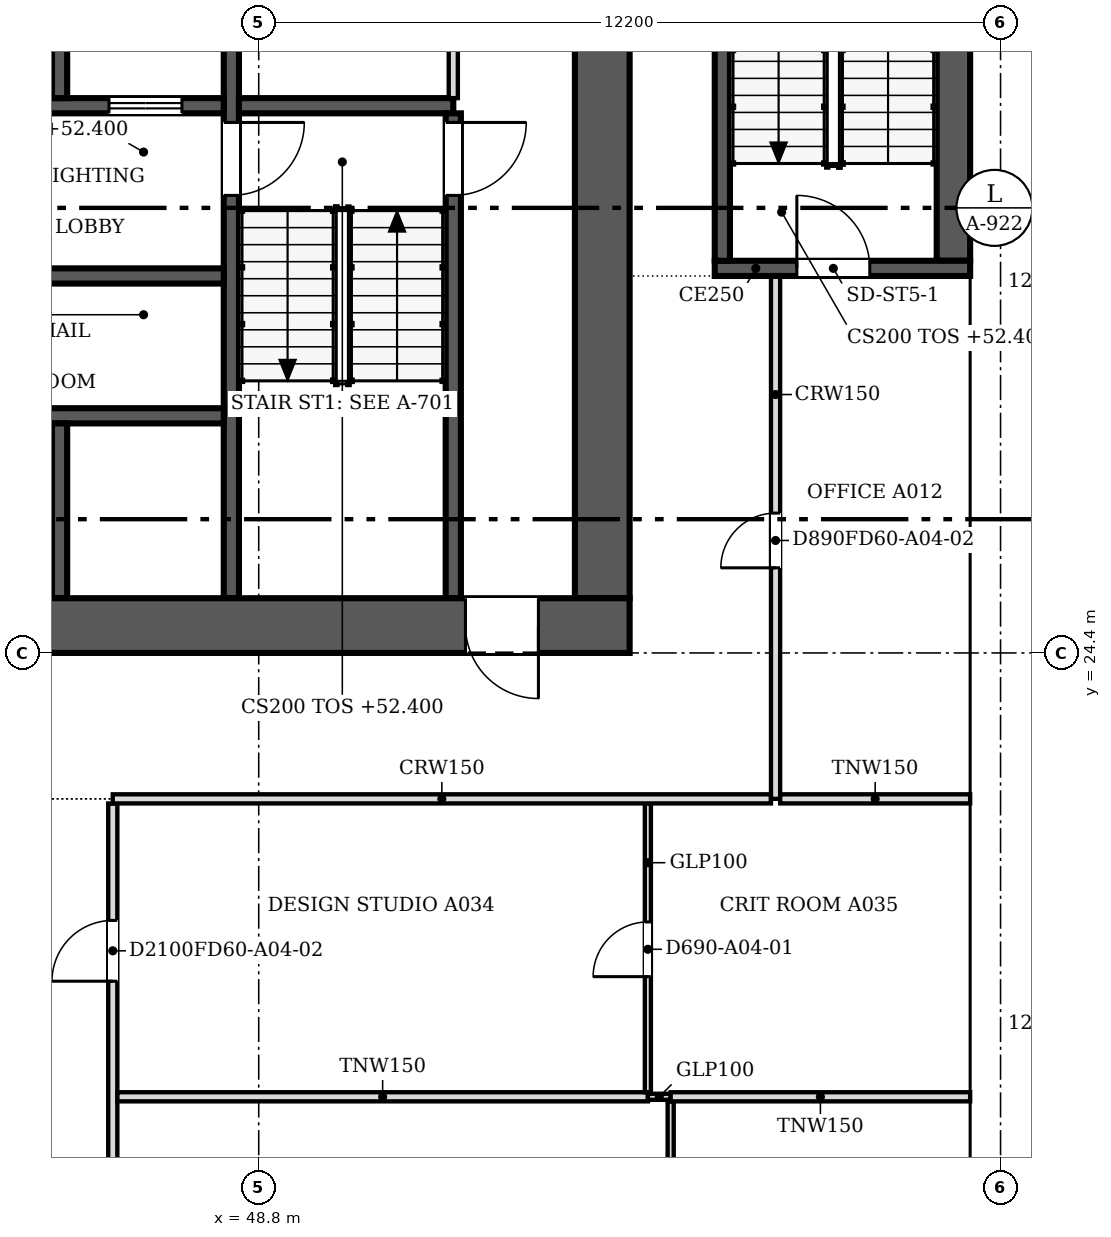
"""IFC4 building model, lengths in metres.
Left out: names, types, materials, properties, quantities, classifications, styles, units other than length and angle.
Written with IfcOpenShell. Run it as: python <this file> out.ifc"""

import sys

from ifc_helpers import new_model, si_unit, direction, frame, frame_2d, origin, place, context, subcontext, project, spatial, polyline, rectangle, outline, extrude, faceted_brep, source, transform, mapped, element, fill, save


model = new_model("IFC4")
c1 = context("Model", 3, precision=1e-05, world=origin(), true_north=direction((0.0, 1.0)))
c2 = subcontext(c1, "Body", "Model", "MODEL_VIEW")
j1 = project(units=[si_unit("LENGTHUNIT", "METRE"), si_unit("PLANEANGLEUNIT", "RADIAN")], contexts=[c1])
p1 = place(None, origin())
s1 = spatial("IfcSite", under=j1, at=p1, CompositionType="ELEMENT")
p2 = place(p1, origin())
s2 = spatial("IfcBuilding", under=s1, at=p2, CompositionType="ELEMENT")
p3 = place(p2, frame((0.0, 0.0, 52.4)))
s3 = spatial("IfcBuildingStorey", under=s2, at=p3, CompositionType="ELEMENT", Elevation=52.4)
m1 = source(origin(), c2, "Body", "SweptSolid", [
    extrude(outline(polyline([(3.05, 0.0), (6.1, 3.8), (3.05, 7.6), (0.0, 3.8), (3.05, 0.0)])), frame((0.0, 0.25, 0.0), z_axis=(0.0, -1.0, 0.0), x_axis=(1.0, 0.0, 0.0)), (0.0, 0.0, 1.0), 0.5),
])
p4 = place(p3, frame((60.75, 15.25, -3.8), z_axis=(0.0, 0.0, 1.0), x_axis=(0.0, 1.0, 0.0)))
e1 = element("IfcWall", 1, at=p4, inside=s3, PredefinedType="SOLIDWALL", context=c2, shape_type="MappedRepresentation", body=[
    mapped(m1, transform((0.0, 0.0, 0.0), scale=1.0)),
])
m2 = source(origin(), c2, "Body", "SweptSolid", [
    extrude(outline(polyline([(3.05, 0.399), (5.78, 3.8), (3.05, 7.2), (0.321, 3.8), (3.05, 0.399)])), frame((0.0, 0.26, 0.0), z_axis=(0.0, -1.0, 0.0), x_axis=(1.0, 0.0, 0.0)), (0.0, 0.0, 1.0), 0.52),
])
p5 = place(p4, origin())
e2 = element("IfcOpeningElement", 2, at=p5, cuts=e1, PredefinedType="OPENING", context=c2, shape_type="MappedRepresentation", body=[
    mapped(m2, transform((0.0, 0.0, 0.0), scale=1.0)),
])
m3 = source(origin(), c2, "Body", "Brep", [
    faceted_brep([(3.05, -0.25, 0.0), (6.1, -0.25, 3.8), (6.1, -0.25, 3.8), (3.05, -0.25, 7.6), (0.0, -0.25, 3.8), (0.0, 0.25, 3.8), (3.05, 0.25, 7.6), (6.1, 0.25, 3.8), (6.1, 0.25, 3.8), (3.05, 0.25, 0.0)], [[[0, 1, 2, 3, 4]], [[5, 6, 7, 8, 9]], [[9, 8, 1, 0]], [[7, 6, 3, 2]], [[6, 5, 4, 3]], [[5, 9, 0, 4]], [[1, 8, 7, 2]]]),
])
p6 = place(p3, frame((60.75, 21.35, -3.8), z_axis=(0.0, 0.0, 1.0), x_axis=(0.0, 1.0, 0.0)))
e3 = element("IfcWall", 3, at=p6, inside=s3, PredefinedType="SOLIDWALL", context=c2, shape_type="MappedRepresentation", body=[
    mapped(m3, transform((0.0, 0.0, 0.0), scale=1.0)),
])
p7 = place(p6, origin())
e4 = element("IfcOpeningElement", 4, at=p7, cuts=e3, PredefinedType="OPENING", context=c2, shape_type="MappedRepresentation", body=[
    mapped(m2, transform((0.0, 0.0, 0.0), scale=1.0)),
])
p8 = place(p3, frame((60.75, 27.45, -3.8), z_axis=(0.0, 0.0, 1.0), x_axis=(0.0, 1.0, 0.0)))
e5 = element("IfcWall", 5, at=p8, inside=s3, PredefinedType="SOLIDWALL", context=c2, shape_type="MappedRepresentation", body=[
    mapped(m1, transform((0.0, 0.0, 0.0), scale=1.0)),
])
p9 = place(p8, origin())
e6 = element("IfcOpeningElement", 6, at=p9, cuts=e5, PredefinedType="OPENING", context=c2, shape_type="MappedRepresentation", body=[
    mapped(m2, transform((0.0, 0.0, 0.0), scale=1.0)),
])
p10 = place(p3, frame((60.75, 33.55, -3.8), z_axis=(0.0, 0.0, 1.0), x_axis=(0.0, 1.0, 0.0)))
e7 = element("IfcWall", 7, at=p10, inside=s3, PredefinedType="SOLIDWALL", context=c2, shape_type="MappedRepresentation", body=[
    mapped(m3, transform((0.0, 0.0, 0.0), scale=1.0)),
])
p11 = place(p10, origin())
e8 = element("IfcOpeningElement", 8, at=p11, cuts=e7, PredefinedType="OPENING", context=c2, shape_type="MappedRepresentation", body=[
    mapped(m2, transform((0.0, 0.0, 0.0), scale=1.0)),
])
p12 = place(p2, frame((0.0, 0.0, 56.2)))
s4 = spatial("IfcBuildingStorey", under=s2, at=p12, CompositionType="ELEMENT", Elevation=56.2)
m4 = source(origin(), c2, "Body", "SweptSolid", [
    extrude(outline(polyline([(3.05, 0.0), (6.1, 3.8), (3.05, 7.6), (0.0, 3.8), (3.05, 0.0)])), frame((0.0, 0.25, 0.0), z_axis=(0.0, -1.0, 0.0), x_axis=(1.0, 0.0, 0.0)), (0.0, 0.0, 1.0), 0.5),
])
p13 = place(p12, frame((60.75, 12.2, -3.8), z_axis=(0.0, 0.0, 1.0), x_axis=(0.0, 1.0, 0.0)))
e9 = element("IfcWall", 9, at=p13, inside=s4, PredefinedType="SOLIDWALL", context=c2, shape_type="MappedRepresentation", body=[
    mapped(m4, transform((0.0, 0.0, 0.0), scale=1.0)),
])
m5 = source(origin(), c2, "Body", "SweptSolid", [
    extrude(outline(polyline([(3.05, 0.399), (5.78, 3.8), (3.05, 7.201), (0.321, 3.8), (3.05, 0.399)])), frame((0.0, 0.26, 0.0), z_axis=(0.0, -1.0, 0.0), x_axis=(1.0, 0.0, 0.0)), (0.0, 0.0, 1.0), 0.52),
])
p14 = place(p13, origin())
e10 = element("IfcOpeningElement", 10, at=p14, cuts=e9, PredefinedType="OPENING", context=c2, shape_type="MappedRepresentation", body=[
    mapped(m5, transform((0.0, 0.0, 0.0), scale=1.0)),
])
m6 = source(origin(), c2, "Body", "Brep", [
    faceted_brep([(3.05, -0.25, 0.0), (6.1, -0.25, 3.8), (6.1, -0.25, 3.8), (3.05, -0.25, 7.6), (0.0, -0.25, 3.8), (0.0, 0.25, 3.8), (3.05, 0.25, 7.6), (6.1, 0.25, 3.8), (6.1, 0.25, 3.8), (3.05, 0.25, 0.0)], [[[0, 1, 2, 3, 4]], [[5, 6, 7, 8, 9]], [[9, 8, 1, 0]], [[7, 6, 3, 2]], [[6, 5, 4, 3]], [[5, 9, 0, 4]], [[1, 8, 7, 2]]]),
])
p15 = place(p12, frame((60.75, 18.3, -3.8), z_axis=(0.0, 0.0, 1.0), x_axis=(0.0, 1.0, 0.0)))
e11 = element("IfcWall", 11, at=p15, inside=s4, PredefinedType="SOLIDWALL", context=c2, shape_type="MappedRepresentation", body=[
    mapped(m6, transform((0.0, 0.0, 0.0), scale=1.0)),
])
p16 = place(p15, origin())
e12 = element("IfcOpeningElement", 12, at=p16, cuts=e11, PredefinedType="OPENING", context=c2, shape_type="MappedRepresentation", body=[
    mapped(m5, transform((0.0, 0.0, 0.0), scale=1.0)),
])
p17 = place(p12, frame((60.75, 24.4, -3.8), z_axis=(0.0, 0.0, 1.0), x_axis=(0.0, 1.0, 0.0)))
e13 = element("IfcWall", 13, at=p17, inside=s4, PredefinedType="SOLIDWALL", context=c2, shape_type="MappedRepresentation", body=[
    mapped(m4, transform((0.0, 0.0, 0.0), scale=1.0)),
])
p18 = place(p17, origin())
e14 = element("IfcOpeningElement", 14, at=p18, cuts=e13, PredefinedType="OPENING", context=c2, shape_type="MappedRepresentation", body=[
    mapped(m5, transform((0.0, 0.0, 0.0), scale=1.0)),
])
p19 = place(p12, frame((60.75, 30.5, -3.8), z_axis=(0.0, 0.0, 1.0), x_axis=(0.0, 1.0, 0.0)))
e15 = element("IfcWall", 15, at=p19, inside=s4, PredefinedType="SOLIDWALL", context=c2, shape_type="MappedRepresentation", body=[
    mapped(m4, transform((0.0, 0.0, 0.0), scale=1.0)),
])
p20 = place(p19, origin())
e16 = element("IfcOpeningElement", 16, at=p20, cuts=e15, PredefinedType="OPENING", context=c2, shape_type="MappedRepresentation", body=[
    mapped(m5, transform((0.0, 0.0, 0.0), scale=1.0)),
])
p21 = place(p3, frame((54.9, 24.85, 0.0), z_axis=(0.0, 0.0, 1.0), x_axis=(-1.0, 0.0, 0.0)))
e17 = element("IfcWall", 17, at=p21, inside=s3, PredefinedType="SHEAR", context=c2, shape_type="SweptSolid", body=[
    extrude(rectangle(XDim=24.4, YDim=0.9, at=frame_2d((12.2, 0.0))), origin(), (0.0, 0.0, 1.0), 3.8),
])
m7 = source(origin(), c2, "Body", "SweptSolid", [
    extrude(rectangle(XDim=1.2, YDim=2.1, at=frame_2d((0.6, 1.05))), frame((0.0, 0.46, 0.0), z_axis=(0.0, -1.0, 0.0), x_axis=(1.0, 0.0, 0.0)), (0.0, 0.0, 1.0), 0.92),
])
p22 = place(p21, frame((1.5, 0.0, 0.0)))
e18 = element("IfcOpeningElement", 18, at=p22, cuts=e17, PredefinedType="OPENING", context=c2, shape_type="MappedRepresentation", body=[
    mapped(m7, transform((0.0, 0.0, 0.0), scale=1.0)),
])
p23 = place(p3, frame((54.45, 47.9, 0.0), z_axis=(0.0, 0.0, 1.0), x_axis=(0.0, -1.0, 0.0)))
e19 = element("IfcWall", 19, at=p23, inside=s3, PredefinedType="SHEAR", context=c2, shape_type="SweptSolid", body=[
    extrude(rectangle(XDim=22.6, YDim=0.9, at=frame_2d((11.3, 0.0))), origin(), (0.0, 0.0, 1.0), 3.8),
])
p24 = place(p23, frame((4.6, 0.0, 0.0)))
e20 = element("IfcOpeningElement", 20, at=p24, cuts=e19, PredefinedType="OPENING", context=c2, shape_type="MappedRepresentation", body=[
    mapped(m7, transform((0.0, 0.0, 0.0), scale=1.0)),
])
p25 = place(p3, frame((48.35, 36.35, 0.0), z_axis=(0.0, 0.0, 1.0), x_axis=(0.0, -1.0, 0.0)))
e21 = element("IfcWall", 21, at=p25, inside=s3, PredefinedType="SOLIDWALL", context=c2, shape_type="SweptSolid", body=[
    extrude(rectangle(XDim=11.05, YDim=0.25, at=frame_2d((5.525, 0.0))), origin(), (0.0, 0.0, 1.0), 3.8),
])
m8 = source(origin(), c2, "Body", "SweptSolid", [
    extrude(rectangle(XDim=1.2, YDim=2.1, at=frame_2d((0.6, 1.05))), frame((0.0, 0.135, 0.0), z_axis=(0.0, -1.0, 0.0), x_axis=(1.0, 0.0, 0.0)), (0.0, 0.0, 1.0), 0.27),
])
p26 = place(p25, frame((3.225, 0.0, 0.0)))
e22 = element("IfcOpeningElement", 22, at=p26, cuts=e21, PredefinedType="OPENING", context=c2, shape_type="MappedRepresentation", body=[
    mapped(m8, transform((0.0, 0.0, 0.0), scale=1.0)),
])
p27 = place(p3, frame((48.225, 33.4, 0.0), z_axis=(0.0, 0.0, 1.0), x_axis=(-1.0, 0.0, 0.0)))
e23 = element("IfcWall", 23, at=p27, inside=s3, PredefinedType="SOLIDWALL", context=c2, shape_type="SweptSolid", body=[
    extrude(rectangle(XDim=5.275, YDim=0.25, at=frame_2d((2.638, 0.0))), origin(), (0.0, 0.0, 1.0), 3.8),
])
p28 = place(p27, frame((3.512, 0.0, 0.0)))
e24 = element("IfcOpeningElement", 24, at=p28, cuts=e23, PredefinedType="OPENING", context=c2, shape_type="MappedRepresentation", body=[
    mapped(m8, transform((0.0, 0.0, 0.0), scale=1.0)),
])
p29 = place(p27, frame((0.688, 0.0, 0.0)))
e25 = element("IfcOpeningElement", 25, at=p29, cuts=e23, PredefinedType="OPENING", context=c2, shape_type="MappedRepresentation", body=[
    mapped(m8, transform((0.0, 0.0, 0.0), scale=1.0)),
])
p30 = place(p3, frame((48.475, 33.4, 0.0), z_axis=(0.0, 0.0, 1.0), x_axis=(1.0, 0.0, 0.0)))
e26 = element("IfcWall", 26, at=p30, inside=s3, PredefinedType="SOLIDWALL", context=c2, shape_type="SweptSolid", body=[
    extrude(rectangle(XDim=3.525, YDim=0.25, at=frame_2d((1.762, 0.0))), origin(), (0.0, 0.0, 1.0), 3.8),
])
p31 = place(p3, frame((42.95, 28.3, 0.0), z_axis=(0.0, 0.0, 1.0), x_axis=(1.0, 0.0, 0.0)))
e27 = element("IfcWall", 27, at=p31, inside=s3, PredefinedType="SOLIDWALL", context=c2, shape_type="SweptSolid", body=[
    extrude(rectangle(XDim=5.275, YDim=0.25, at=frame_2d((2.638, 0.0))), origin(), (0.0, 0.0, 1.0), 3.8),
])
p32 = place(p3, frame((52.0, 25.3, 0.0), z_axis=(0.0, 0.0, 1.0), x_axis=(0.0, 1.0, 0.0)))
e28 = element("IfcWall", 28, at=p32, inside=s3, PredefinedType="SOLIDWALL", context=c2, shape_type="SweptSolid", body=[
    extrude(rectangle(XDim=7.975, YDim=0.25, at=frame_2d((3.987, 0.0))), origin(), (0.0, 0.0, 1.0), 3.8),
])
p33 = place(p32, frame((6.625, 0.0, 0.0)))
e29 = element("IfcOpeningElement", 29, at=p33, cuts=e28, PredefinedType="OPENING", context=c2, shape_type="MappedRepresentation", body=[
    mapped(m8, transform((0.0, 0.0, 0.0), scale=1.0)),
])
p34 = place(p3, frame((45.525, 33.525, 0.0), z_axis=(0.0, 0.0, 1.0), x_axis=(0.0, 1.0, 0.0)))
e30 = element("IfcWall", 30, at=p34, inside=s3, PredefinedType="SOLIDWALL", context=c2, shape_type="SweptSolid", body=[
    extrude(rectangle(XDim=2.825, YDim=0.25, at=frame_2d((1.413, 0.0))), origin(), (0.0, 0.0, 1.0), 3.8),
])
p35 = place(p3, frame((42.95, 30.6, 0.0), z_axis=(0.0, 0.0, 1.0), x_axis=(1.0, 0.0, 0.0)))
e31 = element("IfcWall", 31, at=p35, inside=s3, PredefinedType="SOLIDWALL", context=c2, shape_type="SweptSolid", body=[
    extrude(rectangle(XDim=5.275, YDim=0.25, at=frame_2d((2.638, 0.0))), origin(), (0.0, 0.0, 1.0), 3.8),
])
p36 = place(p3, frame((45.525, 25.3, 0.0), z_axis=(0.0, 0.0, 1.0), x_axis=(0.0, 1.0, 0.0)))
e32 = element("IfcWall", 32, at=p36, inside=s3, PredefinedType="SOLIDWALL", context=c2, shape_type="SweptSolid", body=[
    extrude(rectangle(XDim=2.875, YDim=0.25, at=frame_2d((1.438, 0.0))), origin(), (0.0, 0.0, 1.0), 3.8),
])
p37 = place(p3, frame((52.0, 33.525, 0.0), z_axis=(0.0, 0.0, 1.0), x_axis=(0.0, 1.0, 0.0)))
e33 = element("IfcWall", 33, at=p37, inside=s3, PredefinedType="PARTITIONING", context=c2, shape_type="SweptSolid", body=[
    extrude(rectangle(XDim=6.15, YDim=0.15, at=frame_2d((3.075, 0.0))), origin(), (0.0, 0.0, 1.0), 3.6),
])
m9 = source(origin(), c2, "Body", "SweptSolid", [
    extrude(rectangle(XDim=0.9, YDim=2.1, at=frame_2d((0.45, 1.05))), frame((0.0, 0.085, 0.0), z_axis=(0.0, -1.0, 0.0), x_axis=(1.0, 0.0, 0.0)), (0.0, 0.0, 1.0), 0.17),
])
p38 = place(p37, frame((1.025, 0.0, 0.0)))
e34 = element("IfcOpeningElement", 34, at=p38, cuts=e33, PredefinedType="OPENING", context=c2, shape_type="MappedRepresentation", body=[
    mapped(m9, transform((0.0, 0.0, 0.0), scale=1.0)),
])
p39 = place(p3, frame((60.5, 30.725, 0.0), z_axis=(0.0, 0.0, 1.0), x_axis=(-1.0, 0.0, 0.0)))
e35 = element("IfcWall", 35, at=p39, inside=s3, PredefinedType="SOLIDWALL", context=c2, shape_type="SweptSolid", body=[
    extrude(rectangle(XDim=4.2, YDim=0.25, at=frame_2d((2.1, 0.0))), origin(), (0.0, 0.0, 1.0), 3.8),
])
p40 = place(p39, frame((1.65, 0.0, 0.0)))
e36 = element("IfcOpeningElement", 36, at=p40, cuts=e35, PredefinedType="OPENING", context=c2, shape_type="MappedRepresentation", body=[
    mapped(m8, transform((0.0, 0.0, 0.0), scale=1.0)),
])
p41 = place(p3, frame((56.425, 30.85, 0.0), z_axis=(0.0, 0.0, 1.0), x_axis=(0.0, 1.0, 0.0)))
e37 = element("IfcWall", 37, at=p41, inside=s3, PredefinedType="SOLIDWALL", context=c2, shape_type="SweptSolid", body=[
    extrude(rectangle(XDim=8.0, YDim=0.25, at=frame_2d((4.0, 0.0))), origin(), (0.0, 0.0, 1.0), 3.8),
])
p42 = place(p3, frame((60.225, 38.85, 0.0), z_axis=(0.0, 0.0, 1.0), x_axis=(0.0, -1.0, 0.0)))
e38 = element("IfcWall", 38, at=p42, inside=s3, PredefinedType="SOLIDWALL", context=c2, shape_type="SweptSolid", body=[
    extrude(rectangle(XDim=8.0, YDim=0.55, at=frame_2d((4.0, 0.0))), origin(), (0.0, 0.0, 1.0), 3.8),
])
p43 = place(p3, frame((46.4, 21.924, 0.0), z_axis=(0.0, 0.0, 1.0), x_axis=(0.0, -1.0, 0.0)))
e39 = element("IfcWall", 39, at=p43, inside=s3, PredefinedType="PARTITIONING", context=c2, shape_type="SweptSolid", body=[
    extrude(rectangle(XDim=17.724, YDim=0.15, at=frame_2d((8.862, 0.0))), origin(), (0.0, 0.0, 1.0), 3.067),
])
m10 = source(origin(), c2, "Body", "SweptSolid", [
    extrude(rectangle(XDim=1.0, YDim=2.1, at=frame_2d((0.5, 1.05))), frame((0.0, 0.085, 0.0), z_axis=(0.0, -1.0, 0.0), x_axis=(1.0, 0.0, 0.0)), (0.0, 0.0, 1.0), 0.17),
])
p44 = place(p43, frame((1.923, 0.0, 0.0)))
e40 = element("IfcOpeningElement", 40, at=p44, cuts=e39, PredefinedType="OPENING", context=c2, shape_type="MappedRepresentation", body=[
    mapped(m10, transform((0.0, 0.0, 0.0), scale=1.0)),
])
p45 = place(p43, frame((10.824, 0.0, 0.0)))
e41 = element("IfcOpeningElement", 41, at=p45, cuts=e39, PredefinedType="OPENING", context=c2, shape_type="MappedRepresentation", body=[
    mapped(m10, transform((0.0, 0.0, 0.0), scale=1.0)),
])
p46 = place(p3, frame((55.575, 17.024, 0.0), z_axis=(0.0, 0.0, 1.0), x_axis=(0.0, -1.0, 0.0)))
e42 = element("IfcWall", 42, at=p46, inside=s3, PredefinedType="PARTITIONING", context=c2, shape_type="SweptSolid", body=[
    extrude(rectangle(XDim=8.924, YDim=0.1, at=frame_2d((4.462, 0.0))), origin(), (0.0, 0.0, 1.0), 3.067),
])
m11 = source(origin(), c2, "Body", "SweptSolid", [
    extrude(rectangle(XDim=0.9, YDim=2.1, at=frame_2d((0.45, 1.05))), frame((0.0, 0.06, 0.0), z_axis=(0.0, -1.0, 0.0), x_axis=(1.0, 0.0, 0.0)), (0.0, 0.0, 1.0), 0.12),
])
p47 = place(p46, frame((4.024, 0.0, 0.0)))
e43 = element("IfcOpeningElement", 43, at=p47, cuts=e42, PredefinedType="OPENING", context=c2, shape_type="MappedRepresentation", body=[
    mapped(m11, transform((0.0, 0.0, 0.0), scale=1.0)),
])
p48 = place(p3, frame((46.476, 17.1, 0.0), z_axis=(0.0, 0.0, 1.0), x_axis=(1.0, 0.0, 0.0)))
e44 = element("IfcWall", 44, at=p48, inside=s3, PredefinedType="PARTITIONING", context=c2, shape_type="SweptSolid", body=[
    extrude(rectangle(XDim=8.724, YDim=0.15, at=frame_2d((4.362, 0.0))), origin(), (0.0, 0.0, 1.0), 3.067),
])
p49 = place(p3, frame((55.201, 17.1, 0.0), z_axis=(0.0, 0.0, 1.0), x_axis=(1.0, 0.0, 0.0)))
e45 = element("IfcWall", 45, at=p49, inside=s3, PredefinedType="PARTITIONING", context=c2, shape_type="SweptSolid", body=[
    extrude(rectangle(XDim=0.373, YDim=0.1, at=frame_2d((0.187, 0.0))), origin(), (0.0, 0.0, 1.0), 3.067),
])
p50 = place(p3, frame((55.575, 17.1, 0.0), z_axis=(0.0, 0.0, 1.0), x_axis=(1.0, 0.0, 0.0)))
e46 = element("IfcWall", 46, at=p50, inside=s3, PredefinedType="PARTITIONING", context=c2, shape_type="SweptSolid", body=[
    extrude(rectangle(XDim=4.925, YDim=0.15, at=frame_2d((2.462, 0.0))), origin(), (0.0, 0.0, 1.0), 3.067),
])
p51 = place(p3, frame((55.2, 21.924, 0.0), z_axis=(0.0, 0.0, 1.0), x_axis=(0.0, -1.0, 0.0)))
e47 = element("IfcWall", 47, at=p51, inside=s3, PredefinedType="PARTITIONING", context=c2, shape_type="SweptSolid", body=[
    extrude(rectangle(XDim=4.748, YDim=0.1, at=frame_2d((2.374, 0.0))), origin(), (0.0, 0.0, 1.0), 3.067),
])
p52 = place(p51, frame((1.948, 0.0, 0.0)))
e48 = element("IfcOpeningElement", 48, at=p52, cuts=e47, PredefinedType="OPENING", context=c2, shape_type="MappedRepresentation", body=[
    mapped(m11, transform((0.0, 0.0, 0.0), scale=1.0)),
])
p53 = place(p3, frame((46.4, 22.0, 0.0), z_axis=(0.0, 0.0, 1.0), x_axis=(1.0, 0.0, 0.0)))
e49 = element("IfcWall", 49, at=p53, inside=s3, PredefinedType="PARTITIONING", context=c2, shape_type="SweptSolid", body=[
    extrude(rectangle(XDim=10.824, YDim=0.15, at=frame_2d((5.412, 0.0))), origin(), (0.0, 0.0, 1.0), 3.067),
])
p54 = place(p3, frame((57.3, 30.6, 0.0), z_axis=(0.0, 0.0, 1.0), x_axis=(0.0, -1.0, 0.0)))
e50 = element("IfcWall", 50, at=p54, inside=s3, PredefinedType="PARTITIONING", context=c2, shape_type="SweptSolid", body=[
    extrude(rectangle(XDim=8.6, YDim=0.15, at=frame_2d((4.3, 0.0))), origin(), (0.0, 0.0, 1.0), 3.067),
])
p55 = place(p54, frame((3.9, 0.0, 0.0)))
e51 = element("IfcOpeningElement", 51, at=p55, cuts=e50, PredefinedType="OPENING", context=c2, shape_type="MappedRepresentation", body=[
    mapped(m9, transform((0.0, 0.0, 0.0), scale=1.0)),
])
p56 = place(p3, frame((57.376, 22.0, 0.0), z_axis=(0.0, 0.0, 1.0), x_axis=(1.0, 0.0, 0.0)))
e52 = element("IfcWall", 52, at=p56, inside=s3, PredefinedType="PARTITIONING", context=c2, shape_type="SweptSolid", body=[
    extrude(rectangle(XDim=3.124, YDim=0.15, at=frame_2d((1.562, 0.0))), origin(), (0.0, 0.0, 1.0), 3.067),
])
m12 = source(origin(), c2, "Body", "SweptSolid", [
    extrude(rectangle(XDim=1.2, YDim=2.1, at=frame_2d((0.6, 1.05))), frame((0.0, 0.025, 0.0), z_axis=(0.0, -1.0, 0.0), x_axis=(1.0, 0.0, 0.0)), (0.0, 0.0, 1.0), 0.05),
])
p57 = place(p22, origin())
e53 = element("IfcDoor", 53, at=p57, inside=s3, OperationType="SINGLE_SWING_LEFT", PredefinedType="DOOR", context=c2, shape_type="MappedRepresentation", body=[
    mapped(m12, transform((0.0, 0.0, 0.0), scale=1.0)),
])
fill(e18, e53)
p58 = place(p26, origin())
e54 = element("IfcDoor", 54, at=p58, inside=s3, OperationType="SINGLE_SWING_LEFT", PredefinedType="DOOR", context=c2, shape_type="MappedRepresentation", body=[
    mapped(m12, transform((0.0, 0.0, 0.0), scale=1.0)),
])
fill(e22, e54)
p59 = place(p29, origin())
e55 = element("IfcDoor", 55, at=p59, inside=s3, OperationType="DOUBLE_DOOR_SLIDING", PredefinedType="DOOR", context=c2, shape_type="MappedRepresentation", body=[
    mapped(m12, transform((0.0, 0.0, 0.0), scale=1.0)),
])
fill(e25, e55)
p60 = place(p33, origin())
e56 = element("IfcDoor", 56, at=p60, inside=s3, OperationType="SINGLE_SWING_RIGHT", PredefinedType="DOOR", context=c2, shape_type="MappedRepresentation", body=[
    mapped(m12, transform((0.0, 0.0, 0.0), scale=1.0)),
])
fill(e29, e56)
p61 = place(p40, origin())
e57 = element("IfcDoor", 57, at=p61, inside=s3, OperationType="SINGLE_SWING_RIGHT", PredefinedType="DOOR", context=c2, shape_type="MappedRepresentation", body=[
    mapped(m12, transform((0.0, 0.0, 0.0), scale=1.0)),
])
fill(e36, e57)
m13 = source(origin(), c2, "Body", "SweptSolid", [
    extrude(rectangle(XDim=0.9, YDim=2.1, at=frame_2d((0.45, 1.05))), frame((0.0, 0.025, 0.0), z_axis=(0.0, -1.0, 0.0), x_axis=(1.0, 0.0, 0.0)), (0.0, 0.0, 1.0), 0.05),
])
p62 = place(p52, origin())
e58 = element("IfcDoor", 58, at=p62, inside=s3, OperationType="SINGLE_SWING_RIGHT", PredefinedType="DOOR", context=c2, shape_type="MappedRepresentation", body=[
    mapped(m13, transform((0.0, 0.0, 0.0), scale=1.0)),
])
fill(e48, e58)
m14 = source(origin(), c2, "Body", "SweptSolid", [
    extrude(rectangle(XDim=1.0, YDim=2.1, at=frame_2d((0.5, 1.05))), frame((0.0, 0.025, 0.0), z_axis=(0.0, -1.0, 0.0), x_axis=(1.0, 0.0, 0.0)), (0.0, 0.0, 1.0), 0.05),
])
p63 = place(p44, origin())
e59 = element("IfcDoor", 59, at=p63, inside=s3, OperationType="SINGLE_SWING_RIGHT", PredefinedType="DOOR", context=c2, shape_type="MappedRepresentation", body=[
    mapped(m14, transform((0.0, 0.0, 0.0), scale=1.0)),
])
fill(e40, e59)
p64 = place(p55, origin())
e60 = element("IfcDoor", 60, at=p64, inside=s3, OperationType="SINGLE_SWING_RIGHT", PredefinedType="DOOR", context=c2, shape_type="MappedRepresentation", body=[
    mapped(m13, transform((0.0, 0.0, 0.0), scale=1.0)),
])
fill(e51, e60)
save(model, sys.argv[1])
